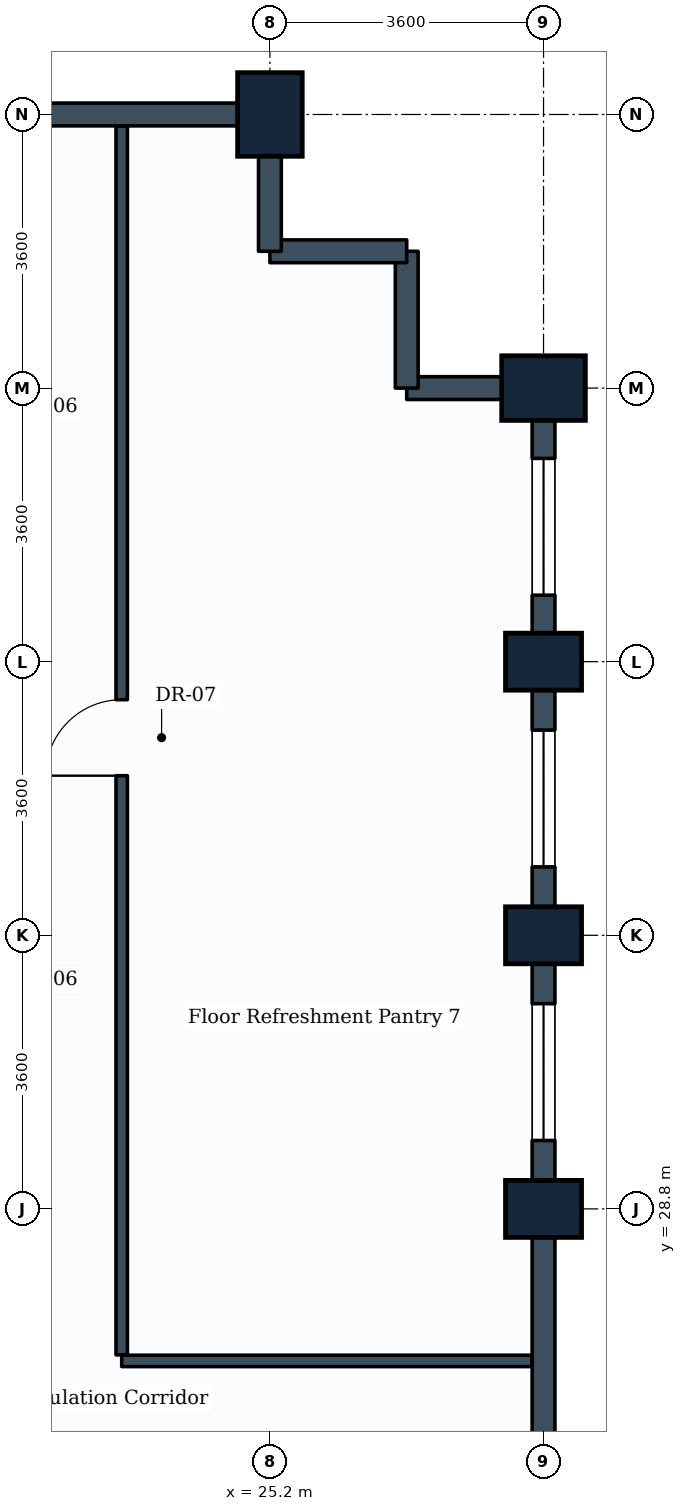
"""IFC4 building model, lengths in metres.
Left out: names, types, materials, properties, quantities, classifications, styles, units other than length and angle.
Written with IfcOpenShell. Run it as: python <this file> out.ifc"""

import sys

from ifc_helpers import new_model, si_unit, direction, frame, frame_2d, origin, origin_2d, place, context, subcontext, project, spatial, rectangle, extrude, element, fill, save


model = new_model("IFC4")
c1 = context("Model", 3, precision=1e-05, world=origin(), true_north=direction((0.0, 1.0)))
c2 = subcontext(c1, "Body", "Model", "MODEL_VIEW")
j1 = project(units=[si_unit("LENGTHUNIT", "METRE"), si_unit("PLANEANGLEUNIT", "RADIAN")], contexts=[c1])
p1 = place(None, origin())
s1 = spatial("IfcSite", under=j1, at=p1, CompositionType="ELEMENT")
p2 = place(p1, origin())
s2 = spatial("IfcBuilding", under=s1, at=p2, CompositionType="ELEMENT")
p3 = place(p2, frame((0.0, 0.0, 135.2)))
s3 = spatial("IfcBuildingStorey", under=s2, at=p3, CompositionType="ELEMENT", Elevation=135.2)
p4 = place(p3, frame((25.2, 43.2, 0.0), z_axis=(0.0, 0.0, 1.0), x_axis=(1.0, 0.0, 0.0)))
e1 = element("IfcColumn", 1, at=p4, inside=s3, PredefinedType="COLUMN", context=c2, shape_type="SweptSolid", body=[
    extrude(rectangle(XDim=0.85, YDim=1.1, at=origin_2d()), origin(), (0.0, 0.0, 1.0), 3.8),
])
for number, where, z_axis, x_axis in (
    (2, (28.8, 28.8, 0.0), (0.0, 0.0, 1.0), (0.0, 1.0, 0.0)),
    (3, (28.8, 32.4, 0.0), (0.0, 0.0, 1.0), (0.0, 1.0, 0.0)),
    (4, (28.8, 36.0, 0.0), (0.0, 0.0, 1.0), (0.0, 1.0, 0.0)),
):
    element("IfcColumn", number, at=place(p3, frame(where, z_axis=z_axis, x_axis=x_axis)), inside=s3, PredefinedType="COLUMN", context=c2, shape_type="SweptSolid", body=[
        extrude(rectangle(XDim=0.75, YDim=1.0, at=origin_2d()), origin(), (0.0, 0.0, 1.0), 3.8),
    ])
p5 = place(p3, frame((28.8, 39.6, 0.0), z_axis=(0.0, 0.0, 1.0), x_axis=(0.0, 1.0, 0.0)))
e5 = element("IfcColumn", 5, at=p5, inside=s3, PredefinedType="COLUMN", context=c2, shape_type="SweptSolid", body=[
    extrude(rectangle(XDim=0.85, YDim=1.1, at=origin_2d()), origin(), (0.0, 0.0, 1.0), 3.8),
])
p6 = place(p3, frame((28.8, 28.8, 0.0), z_axis=(0.0, 0.0, 1.0), x_axis=(0.0, -1.0, 0.0)))
e6 = element("IfcWall", 6, at=p6, inside=s3, PredefinedType="STANDARD", context=c2, shape_type="SweptSolid", body=[
    extrude(rectangle(XDim=3.6, YDim=0.3, at=frame_2d((1.8, 0.0))), origin(), (0.0, 0.0, 1.0), 3.17),
])
p7 = place(p3, frame((28.8, 32.4, 0.0), z_axis=(0.0, 0.0, 1.0), x_axis=(0.0, -1.0, 0.0)))
e7 = element("IfcWall", 7, at=p7, inside=s3, PredefinedType="STANDARD", context=c2, shape_type="SweptSolid", body=[
    extrude(rectangle(XDim=3.6, YDim=0.3, at=frame_2d((1.8, 0.0))), origin(), (0.0, 0.0, 1.0), 2.93),
])
p8 = place(p7, frame((0.9, 0.0, 0.85)))
e8 = element("IfcOpeningElement", 8, at=p8, cuts=e7, PredefinedType="OPENING", context=c2, shape_type="SweptSolid", body=[
    extrude(rectangle(XDim=1.8, YDim=1.35, at=frame_2d((0.9, 0.675))), frame((0.0, 0.16, 0.0), z_axis=(0.0, -1.0, 0.0), x_axis=(1.0, 0.0, 0.0)), (0.0, 0.0, 1.0), 0.32),
])
p9 = place(p3, frame((28.8, 36.0, 0.0), z_axis=(0.0, 0.0, 1.0), x_axis=(0.0, -1.0, 0.0)))
e9 = element("IfcWall", 9, at=p9, inside=s3, PredefinedType="STANDARD", context=c2, shape_type="SweptSolid", body=[
    extrude(rectangle(XDim=3.6, YDim=0.3, at=frame_2d((1.8, 0.0))), origin(), (0.0, 0.0, 1.0), 2.93),
])
p10 = place(p9, frame((0.9, 0.0, 0.85)))
e10 = element("IfcOpeningElement", 10, at=p10, cuts=e9, PredefinedType="OPENING", context=c2, shape_type="SweptSolid", body=[
    extrude(rectangle(XDim=1.8, YDim=1.35, at=frame_2d((0.9, 0.675))), frame((0.0, 0.16, 0.0), z_axis=(0.0, -1.0, 0.0), x_axis=(1.0, 0.0, 0.0)), (0.0, 0.0, 1.0), 0.32),
])
p11 = place(p3, frame((28.8, 39.6, 0.0), z_axis=(0.0, 0.0, 1.0), x_axis=(0.0, -1.0, 0.0)))
e11 = element("IfcWall", 11, at=p11, inside=s3, PredefinedType="STANDARD", context=c2, shape_type="SweptSolid", body=[
    extrude(rectangle(XDim=3.6, YDim=0.3, at=frame_2d((1.8, 0.0))), origin(), (0.0, 0.0, 1.0), 2.93),
])
p12 = place(p11, frame((0.925, 0.0, 0.85)))
e12 = element("IfcOpeningElement", 12, at=p12, cuts=e11, PredefinedType="OPENING", context=c2, shape_type="SweptSolid", body=[
    extrude(rectangle(XDim=1.8, YDim=1.35, at=frame_2d((0.9, 0.675))), frame((0.0, 0.16, 0.0), z_axis=(0.0, -1.0, 0.0), x_axis=(1.0, 0.0, 0.0)), (0.0, 0.0, 1.0), 0.32),
])
p13 = place(p3, frame((27.0, 39.6, 0.0), z_axis=(0.0, 0.0, 1.0), x_axis=(1.0, 0.0, 0.0)))
e13 = element("IfcWall", 13, at=p13, inside=s3, PredefinedType="STANDARD", context=c2, shape_type="SweptSolid", body=[
    extrude(rectangle(XDim=1.8, YDim=0.3, at=frame_2d((0.9, 0.0))), origin(), (0.0, 0.0, 1.0), 2.93),
])
p14 = place(p3, frame((27.0, 39.6, 0.0), z_axis=(0.0, 0.0, 1.0), x_axis=(0.0, 1.0, 0.0)))
e14 = element("IfcWall", 14, at=p14, inside=s3, PredefinedType="STANDARD", context=c2, shape_type="SweptSolid", body=[
    extrude(rectangle(XDim=1.8, YDim=0.3, at=frame_2d((0.9, 0.0))), origin(), (0.0, 0.0, 1.0), 3.535),
])
p15 = place(p3, frame((25.2, 41.4, 0.0), z_axis=(0.0, 0.0, 1.0), x_axis=(1.0, 0.0, 0.0)))
e15 = element("IfcWall", 15, at=p15, inside=s3, PredefinedType="STANDARD", context=c2, shape_type="SweptSolid", body=[
    extrude(rectangle(XDim=1.8, YDim=0.3, at=frame_2d((0.9, 0.0))), origin(), (0.0, 0.0, 1.0), 3.535),
])
p16 = place(p3, frame((25.2, 41.4, 0.0), z_axis=(0.0, 0.0, 1.0), x_axis=(0.0, 1.0, 0.0)))
e16 = element("IfcWall", 16, at=p16, inside=s3, PredefinedType="STANDARD", context=c2, shape_type="SweptSolid", body=[
    extrude(rectangle(XDim=1.8, YDim=0.3, at=frame_2d((0.9, 0.0))), origin(), (0.0, 0.0, 1.0), 2.93),
])
p17 = place(p3, frame((21.6, 43.2, 0.0), z_axis=(0.0, 0.0, 1.0), x_axis=(1.0, 0.0, 0.0)))
e17 = element("IfcWall", 17, at=p17, inside=s3, PredefinedType="STANDARD", context=c2, shape_type="SweptSolid", body=[
    extrude(rectangle(XDim=3.6, YDim=0.3, at=frame_2d((1.8, 0.0))), origin(), (0.0, 0.0, 1.0), 2.93),
])
p18 = place(p3, frame((23.25, 26.8, 0.0), z_axis=(0.0, 0.0, 1.0), x_axis=(1.0, 0.0, 0.0)))
e18 = element("IfcWall", 18, at=p18, inside=s3, PredefinedType="PARTITIONING", context=c2, shape_type="SweptSolid", body=[
    extrude(rectangle(XDim=5.396, YDim=0.15, at=frame_2d((2.698, 0.0))), origin(), (0.0, 0.0, 1.0), 3.535),
])
p19 = place(p3, frame((23.25, 26.879, 0.0), z_axis=(0.0, 0.0, 1.0), x_axis=(0.0, 1.0, 0.0)))
e19 = element("IfcWall", 19, at=p19, inside=s3, PredefinedType="PARTITIONING", context=c2, shape_type="SweptSolid", body=[
    extrude(rectangle(XDim=16.167, YDim=0.15, at=frame_2d((8.083, 0.0))), origin(), (0.0, 0.0, 1.0), 2.93),
])
p20 = place(p19, frame((7.621, 0.0, 0.0)))
e20 = element("IfcOpeningElement", 20, at=p20, cuts=e19, PredefinedType="OPENING", context=c2, shape_type="SweptSolid", body=[
    extrude(rectangle(XDim=1.0, YDim=2.1, at=frame_2d((0.5, 1.05))), frame((0.0, 0.085, 0.0), z_axis=(0.0, -1.0, 0.0), x_axis=(1.0, 0.0, 0.0)), (0.0, 0.0, 1.0), 0.17),
])
p21 = place(p8, origin())
e21 = element("IfcWindow", 21, at=p21, inside=s3, PartitioningType="SINGLE_PANEL", PredefinedType="WINDOW", context=c2, shape_type="SweptSolid", body=[
    extrude(rectangle(XDim=1.8, YDim=1.35, at=frame_2d((0.9, 0.675))), frame((0.0, 0.03, 0.0), z_axis=(0.0, -1.0, 0.0), x_axis=(1.0, 0.0, 0.0)), (0.0, 0.0, 1.0), 0.06),
])
fill(e8, e21)
p22 = place(p10, origin())
e22 = element("IfcWindow", 22, at=p22, inside=s3, PartitioningType="SINGLE_PANEL", PredefinedType="WINDOW", context=c2, shape_type="SweptSolid", body=[
    extrude(rectangle(XDim=1.8, YDim=1.35, at=frame_2d((0.9, 0.675))), frame((0.0, 0.03, 0.0), z_axis=(0.0, -1.0, 0.0), x_axis=(1.0, 0.0, 0.0)), (0.0, 0.0, 1.0), 0.06),
])
fill(e10, e22)
p23 = place(p12, origin())
e23 = element("IfcWindow", 23, at=p23, inside=s3, PartitioningType="SINGLE_PANEL", PredefinedType="WINDOW", context=c2, shape_type="SweptSolid", body=[
    extrude(rectangle(XDim=1.8, YDim=1.35, at=frame_2d((0.9, 0.675))), frame((0.0, 0.03, 0.0), z_axis=(0.0, -1.0, 0.0), x_axis=(1.0, 0.0, 0.0)), (0.0, 0.0, 1.0), 0.06),
])
fill(e12, e23)
p24 = place(p20, origin())
e24 = element("IfcDoor", 24, at=p24, inside=s3, OperationType="SINGLE_SWING_LEFT", PredefinedType="DOOR", context=c2, shape_type="SweptSolid", body=[
    extrude(rectangle(XDim=1.0, YDim=2.1, at=frame_2d((0.5, 1.05))), frame((0.0, 0.025, 0.0), z_axis=(0.0, -1.0, 0.0), x_axis=(1.0, 0.0, 0.0)), (0.0, 0.0, 1.0), 0.05),
])
fill(e20, e24)
save(model, sys.argv[1])
